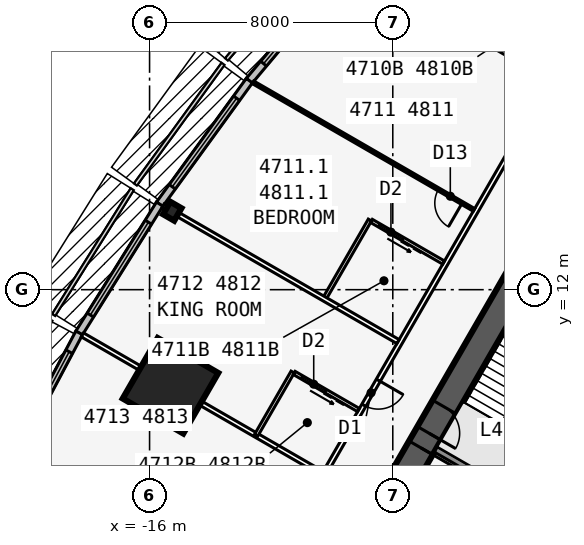
"""IFC4 building model, lengths in metres.
Left out: names, types, materials, properties, quantities, classifications, styles, units other than length and angle.
Written with IfcOpenShell. Run it as: python <this file> out.ifc"""

import sys

from ifc_helpers import new_model, si_unit, direction, frame, frame_2d, origin, origin_2d, place, context, subcontext, project, spatial, rectangle, i_section, extrude, element, fill, save


model = new_model("IFC4")
c1 = context("Model", 3, precision=1e-05, world=origin(), true_north=direction((0.0, 1.0)))
c2 = subcontext(c1, "Body", "Model", "MODEL_VIEW")
j1 = project(units=[si_unit("LENGTHUNIT", "METRE"), si_unit("PLANEANGLEUNIT", "RADIAN")], contexts=[c1])
p1 = place(None, origin())
s1 = spatial("IfcSite", under=j1, at=p1, CompositionType="ELEMENT")
p2 = place(p1, origin())
s2 = spatial("IfcBuilding", under=s1, at=p2, CompositionType="ELEMENT")
p3 = place(p2, frame((0.0, 0.0, 175.9)))
s3 = spatial("IfcBuildingStorey", under=s2, at=p3, CompositionType="ELEMENT", Elevation=175.9)
p4 = place(p3, frame((0.0, 19.052, 0.0), z_axis=(0.0, 0.0, 1.0), x_axis=(-0.499999749417, -0.866025548458, 0.0)))
e1 = element("IfcWall", 1, at=p4, inside=s3, PredefinedType="SHEAR", context=c2, shape_type="SweptSolid", body=[
    extrude(rectangle(XDim=33.0, YDim=0.9, at=frame_2d((16.5, 0.0))), origin(), (0.0, 0.0, 1.0), 3.4),
])
p5 = place(p4, frame((14.15, 0.0, 0.0)))
e2 = element("IfcOpeningElement", 2, at=p5, cuts=e1, PredefinedType="OPENING", context=c2, shape_type="SweptSolid", body=[
    extrude(rectangle(XDim=1.8, YDim=2.13, at=frame_2d((0.9, 1.065))), frame((0.0, 0.46, 0.0), z_axis=(0.0, -1.0, 0.0), x_axis=(1.0, 0.0, 0.0)), (0.0, 0.0, 1.0), 0.92),
])
p6 = place(p4, frame((12.6, 0.0, 0.0)))
e3 = element("IfcOpeningElement", 3, at=p6, cuts=e1, PredefinedType="OPENING", context=c2, shape_type="SweptSolid", body=[
    extrude(rectangle(XDim=1.0, YDim=2.13, at=frame_2d((0.5, 1.065))), frame((0.0, 0.46, 0.0), z_axis=(0.0, -1.0, 0.0), x_axis=(1.0, 0.0, 0.0)), (0.0, 0.0, 1.0), 0.92),
])
p7 = place(p3, frame((-3.879, 5.184, 0.0), z_axis=(0.0, 0.0, 1.0), x_axis=(-0.866022959057, 0.500004234368, 0.0)))
e4 = element("IfcWall", 4, at=p7, inside=s3, PredefinedType="SOLIDWALL", context=c2, shape_type="SweptSolid", body=[
    extrude(rectangle(XDim=3.125, YDim=0.2, at=frame_2d((1.562, 0.0))), origin(), (0.0, 0.0, 1.0), 3.235),
])
p8 = place(p3, frame((-15.254, 14.58, 0.0), z_axis=(0.0, 0.0, 1.0), x_axis=(-0.866025403784, 0.5, 0.0)))
e5 = element("IfcColumn", 5, at=p8, inside=s3, PredefinedType="COLUMN", context=c2, shape_type="SweptSolid", body=[
    extrude(i_section(OverallWidth=0.424, OverallDepth=0.475, WebThickness=0.048, FlangeThickness=0.077, at=origin_2d()), origin(), (0.0, 0.0, 1.0), 3.4),
])
p9 = place(p3, frame((-15.312, 8.84, 0.0), z_axis=(0.0, 0.0, 1.0), x_axis=(-0.866025403784, 0.5, 0.0)))
e6 = element("IfcColumn", 6, at=p9, inside=s3, PredefinedType="COLUMN", context=c2, shape_type="SweptSolid", body=[
    extrude(rectangle(XDim=2.3, YDim=2.3, at=origin_2d()), origin(), (0.0, 0.0, 1.0), 3.4),
])
p10 = place(p3, frame((-9.465, 22.76, 0.0), z_axis=(0.0, 0.0, 1.0), x_axis=(-0.641810386606, -0.766863369607, 0.0)))
e7 = element("IfcWall", 7, at=p10, inside=s3, PredefinedType="STANDARD", context=c2, shape_type="SweptSolid", body=[
    extrude(rectangle(XDim=5.076, YDim=0.25, at=frame_2d((2.538, 0.0))), origin(), (0.0, 0.0, 1.0), 3.235),
])
p11 = place(p10, frame((0.738, 0.0, 0.45)))
e8 = element("IfcOpeningElement", 8, at=p11, cuts=e7, PredefinedType="OPENING", context=c2, shape_type="SweptSolid", body=[
    extrude(rectangle(XDim=3.6, YDim=2.4, at=frame_2d((1.8, 1.2))), frame((0.0, 0.135, 0.0), z_axis=(0.0, -1.0, 0.0), x_axis=(1.0, 0.0, 0.0)), (0.0, 0.0, 1.0), 0.27),
])
p12 = place(p3, frame((-12.718, 18.875, 0.0), z_axis=(0.0, 0.0, 1.0), x_axis=(-0.587669188412, -0.809101307001, 0.0)))
e9 = element("IfcWall", 9, at=p12, inside=s3, PredefinedType="STANDARD", context=c2, shape_type="SweptSolid", body=[
    extrude(rectangle(XDim=5.028, YDim=0.25, at=frame_2d((2.514, 0.0))), origin(), (0.0, 0.0, 1.0), 3.235),
])
p13 = place(p12, frame((0.714, 0.0, 0.45)))
e10 = element("IfcOpeningElement", 10, at=p13, cuts=e9, PredefinedType="OPENING", context=c2, shape_type="SweptSolid", body=[
    extrude(rectangle(XDim=3.6, YDim=2.4, at=frame_2d((1.8, 1.2))), frame((0.0, 0.135, 0.0), z_axis=(0.0, -1.0, 0.0), x_axis=(1.0, 0.0, 0.0)), (0.0, 0.0, 1.0), 0.27),
])
p14 = place(p3, frame((-15.667, 14.814, 0.0), z_axis=(0.0, 0.0, 1.0), x_axis=(-0.529990167382, -0.84800378683, 0.0)))
e11 = element("IfcWall", 11, at=p14, inside=s3, PredefinedType="STANDARD", context=c2, shape_type="SweptSolid", body=[
    extrude(rectangle(XDim=5.003, YDim=0.25, at=frame_2d((2.501, 0.0))), origin(), (0.0, 0.0, 1.0), 3.235),
])
p15 = place(p14, frame((0.701, 0.0, 0.45)))
e12 = element("IfcOpeningElement", 12, at=p15, cuts=e11, PredefinedType="OPENING", context=c2, shape_type="SweptSolid", body=[
    extrude(rectangle(XDim=3.6, YDim=2.4, at=frame_2d((1.8, 1.2))), frame((0.0, 0.135, 0.0), z_axis=(0.0, -1.0, 0.0), x_axis=(1.0, 0.0, 0.0)), (0.0, 0.0, 1.0), 0.27),
])
p16 = place(p3, frame((-18.314, 10.579, 0.0), z_axis=(0.0, 0.0, 1.0), x_axis=(-0.469404966864, -0.882982999317, 0.0)))
e13 = element("IfcWall", 13, at=p16, inside=s3, PredefinedType="STANDARD", context=c2, shape_type="SweptSolid", body=[
    extrude(rectangle(XDim=5.003, YDim=0.25, at=frame_2d((2.501, 0.0))), origin(), (0.0, 0.0, 1.0), 3.235),
])
p17 = place(p16, frame((0.701, 0.0, 0.45)))
e14 = element("IfcOpeningElement", 14, at=p17, cuts=e13, PredefinedType="OPENING", context=c2, shape_type="SweptSolid", body=[
    extrude(rectangle(XDim=3.6, YDim=2.4, at=frame_2d((1.8, 1.2))), frame((0.0, 0.135, 0.0), z_axis=(0.0, -1.0, 0.0), x_axis=(1.0, 0.0, 0.0)), (0.0, 0.0, 1.0), 0.27),
])
p18 = place(p3, frame((-0.5, 22.836, 0.0), z_axis=(0.0, 0.0, 1.0), x_axis=(-0.500001677587, -0.866024435227, 0.0)))
e15 = element("IfcWall", 15, at=p18, inside=s3, PredefinedType="PARTITIONING", context=c2, shape_type="SweptSolid", body=[
    extrude(rectangle(XDim=39.054, YDim=0.15, at=frame_2d((19.527, 0.0))), origin(), (0.0, 0.0, 1.0), 3.235),
])
p19 = place(p18, frame((0.352, 0.0, 0.0)))
e16 = element("IfcOpeningElement", 16, at=p19, cuts=e15, PredefinedType="OPENING", context=c2, shape_type="SweptSolid", body=[
    extrude(rectangle(XDim=0.95, YDim=2.13, at=frame_2d((0.475, 1.065))), frame((0.0, 0.085, 0.0), z_axis=(0.0, -1.0, 0.0), x_axis=(1.0, 0.0, 0.0)), (0.0, 0.0, 1.0), 0.17),
])
p20 = place(p18, frame((6.552, 0.0, 0.0)))
e17 = element("IfcOpeningElement", 17, at=p20, cuts=e15, PredefinedType="OPENING", context=c2, shape_type="SweptSolid", body=[
    extrude(rectangle(XDim=0.95, YDim=2.13, at=frame_2d((0.475, 1.065))), frame((0.0, 0.085, 0.0), z_axis=(0.0, -1.0, 0.0), x_axis=(1.0, 0.0, 0.0)), (0.0, 0.0, 1.0), 0.17),
])
p21 = place(p18, frame((15.952, 0.0, 0.0)))
e18 = element("IfcOpeningElement", 18, at=p21, cuts=e15, PredefinedType="OPENING", context=c2, shape_type="SweptSolid", body=[
    extrude(rectangle(XDim=0.95, YDim=2.13, at=frame_2d((0.475, 1.065))), frame((0.0, 0.085, 0.0), z_axis=(0.0, -1.0, 0.0), x_axis=(1.0, 0.0, 0.0)), (0.0, 0.0, 1.0), 0.17),
])
p22 = place(p18, frame((21.552, 0.0, 0.0)))
e19 = element("IfcOpeningElement", 19, at=p22, cuts=e15, PredefinedType="OPENING", context=c2, shape_type="SweptSolid", body=[
    extrude(rectangle(XDim=0.95, YDim=2.13, at=frame_2d((0.475, 1.065))), frame((0.0, 0.085, 0.0), z_axis=(0.0, -1.0, 0.0), x_axis=(1.0, 0.0, 0.0)), (0.0, 0.0, 1.0), 0.17),
])
p23 = place(p18, frame((30.952, 0.0, 0.0)))
e20 = element("IfcOpeningElement", 20, at=p23, cuts=e15, PredefinedType="OPENING", context=c2, shape_type="SweptSolid", body=[
    extrude(rectangle(XDim=0.95, YDim=2.13, at=frame_2d((0.475, 1.065))), frame((0.0, 0.085, 0.0), z_axis=(0.0, -1.0, 0.0), x_axis=(1.0, 0.0, 0.0)), (0.0, 0.0, 1.0), 0.17),
])
p24 = place(p18, frame((37.752, 0.0, 0.0)))
e21 = element("IfcOpeningElement", 21, at=p24, cuts=e15, PredefinedType="OPENING", context=c2, shape_type="SweptSolid", body=[
    extrude(rectangle(XDim=0.95, YDim=2.13, at=frame_2d((0.475, 1.065))), frame((0.0, 0.085, 0.0), z_axis=(0.0, -1.0, 0.0), x_axis=(1.0, 0.0, 0.0)), (0.0, 0.0, 1.0), 0.17),
])
p25 = place(p3, frame((-2.829, 18.954, 0.0), z_axis=(0.0, 0.0, 1.0), x_axis=(-0.866015739374, 0.500016738876, 0.0)))
e22 = element("IfcWall", 22, at=p25, inside=s3, PredefinedType="PARTITIONING", context=c2, shape_type="SweptSolid", body=[
    extrude(rectangle(XDim=7.516, YDim=0.15, at=frame_2d((3.758, 0.0))), origin(), (0.0, 0.0, 1.0), 2.389),
])
p26 = place(p3, frame((-5.329, 14.623, 0.0), z_axis=(0.0, 0.0, 1.0), x_axis=(-0.866011723728, 0.500023693804, 0.0)))
e23 = element("IfcWall", 23, at=p26, inside=s3, PredefinedType="PARTITIONING", context=c2, shape_type="SweptSolid", body=[
    extrude(rectangle(XDim=8.395, YDim=0.1, at=frame_2d((4.198, 0.0))), origin(), (0.0, 0.0, 1.0), 2.389),
])
p27 = place(p26, frame((0.45, 0.0, 0.0)))
e24 = element("IfcOpeningElement", 24, at=p27, cuts=e23, PredefinedType="OPENING", context=c2, shape_type="SweptSolid", body=[
    extrude(rectangle(XDim=0.9, YDim=2.13, at=frame_2d((0.45, 1.065))), frame((0.0, 0.06, 0.0), z_axis=(0.0, -1.0, 0.0), x_axis=(1.0, 0.0, 0.0)), (0.0, 0.0, 1.0), 0.12),
])
p28 = place(p3, frame((-7.829, 10.293, 0.0), z_axis=(0.0, 0.0, 1.0), x_axis=(-0.866027015393, 0.499997208602, 0.0)))
e25 = element("IfcWall", 25, at=p28, inside=s3, PredefinedType="PARTITIONING", context=c2, shape_type="SweptSolid", body=[
    extrude(rectangle(XDim=8.922, YDim=0.15, at=frame_2d((4.461, 0.0))), origin(), (0.0, 0.0, 1.0), 2.389),
])
p29 = place(p3, frame((-10.329, 5.963, 0.0), z_axis=(0.0, 0.0, 1.0), x_axis=(-0.866025170687, 0.500000403736, 0.0)))
e26 = element("IfcWall", 26, at=p29, inside=s3, PredefinedType="PARTITIONING", context=c2, shape_type="SweptSolid", body=[
    extrude(rectangle(XDim=9.099, YDim=0.15, at=frame_2d((4.549, 0.0))), origin(), (0.0, 0.0, 1.0), 2.389),
])
p30 = place(p3, frame((-8.753, 14.291, 0.0), z_axis=(0.0, 0.0, 1.0), x_axis=(-0.50002537861, -0.866010750942, 0.0)))
e27 = element("IfcWall", 27, at=p30, inside=s3, PredefinedType="PLUMBINGWALL", context=c2, shape_type="SweptSolid", body=[
    extrude(rectangle(XDim=3.0, YDim=0.12, at=frame_2d((1.5, 0.0))), origin(), (0.0, 0.0, 1.0), 3.235),
])
p31 = place(p3, frame((-6.329, 12.891, 0.0), z_axis=(0.0, 0.0, 1.0), x_axis=(-0.866035715982, 0.499982138324, 0.0)))
e28 = element("IfcWall", 28, at=p31, inside=s3, PredefinedType="PLUMBINGWALL", context=c2, shape_type="SweptSolid", body=[
    extrude(rectangle(XDim=2.74, YDim=0.12, at=frame_2d((1.37, 0.0))), origin(), (0.0, 0.0, 1.0), 3.235),
])
p32 = place(p31, frame((1.55, 0.0, 0.0)))
e29 = element("IfcOpeningElement", 29, at=p32, cuts=e28, PredefinedType="OPENING", context=c2, shape_type="SweptSolid", body=[
    extrude(rectangle(XDim=0.9, YDim=2.13, at=frame_2d((0.45, 1.065))), frame((0.0, 0.07, 0.0), z_axis=(0.0, -1.0, 0.0), x_axis=(1.0, 0.0, 0.0)), (0.0, 0.0, 1.0), 0.14),
])
p33 = place(p3, frame((-11.293, 9.292, 0.0), z_axis=(0.0, 0.0, 1.0), x_axis=(-0.500001309137, -0.866024647952, 0.0)))
e30 = element("IfcWall", 30, at=p33, inside=s3, PredefinedType="PLUMBINGWALL", context=c2, shape_type="SweptSolid", body=[
    extrude(rectangle(XDim=2.4, YDim=0.12, at=frame_2d((1.2, 0.0))), origin(), (0.0, 0.0, 1.0), 3.235),
])
p34 = place(p3, frame((-9.128, 8.042, 0.0), z_axis=(0.0, 0.0, 1.0), x_axis=(-0.866005645448, 0.500034220881, 0.0)))
e31 = element("IfcWall", 31, at=p34, inside=s3, PredefinedType="PLUMBINGWALL", context=c2, shape_type="SweptSolid", body=[
    extrude(rectangle(XDim=2.44, YDim=0.12, at=frame_2d((1.22, 0.0))), origin(), (0.0, 0.0, 1.0), 3.235),
])
p35 = place(p34, frame((1.25, 0.0, 0.0)))
e32 = element("IfcOpeningElement", 32, at=p35, cuts=e31, PredefinedType="OPENING", context=c2, shape_type="SweptSolid", body=[
    extrude(rectangle(XDim=0.9, YDim=2.13, at=frame_2d((0.45, 1.065))), frame((0.0, 0.07, 0.0), z_axis=(0.0, -1.0, 0.0), x_axis=(1.0, 0.0, 0.0)), (0.0, 0.0, 1.0), 0.14),
])
p36 = place(p3, frame((-2.988, 9.978, 0.0), z_axis=(0.0, 0.0, 1.0), x_axis=(-0.499992232847, -0.866029888106, 0.0)))
e33 = element("IfcWall", 33, at=p36, inside=s3, PredefinedType="SOLIDWALL", context=c2, shape_type="SweptSolid", body=[
    extrude(rectangle(XDim=2.794, YDim=0.1, at=frame_2d((1.397, 0.0))), origin(), (0.0, 0.0, 1.0), 3.4),
])
p37 = place(p11, origin())
e34 = element("IfcWindow", 34, at=p37, inside=s3, PartitioningType="SINGLE_PANEL", PredefinedType="WINDOW", context=c2, shape_type="SweptSolid", body=[
    extrude(rectangle(XDim=3.6, YDim=2.4, at=frame_2d((1.8, 1.2))), frame((0.0, 0.03, 0.0), z_axis=(0.0, -1.0, 0.0), x_axis=(1.0, 0.0, 0.0)), (0.0, 0.0, 1.0), 0.06),
])
fill(e8, e34)
p38 = place(p13, origin())
e35 = element("IfcWindow", 35, at=p38, inside=s3, PartitioningType="SINGLE_PANEL", PredefinedType="WINDOW", context=c2, shape_type="SweptSolid", body=[
    extrude(rectangle(XDim=3.6, YDim=2.4, at=frame_2d((1.8, 1.2))), frame((0.0, 0.03, 0.0), z_axis=(0.0, -1.0, 0.0), x_axis=(1.0, 0.0, 0.0)), (0.0, 0.0, 1.0), 0.06),
])
fill(e10, e35)
p39 = place(p15, origin())
e36 = element("IfcWindow", 36, at=p39, inside=s3, PartitioningType="SINGLE_PANEL", PredefinedType="WINDOW", context=c2, shape_type="SweptSolid", body=[
    extrude(rectangle(XDim=3.6, YDim=2.4, at=frame_2d((1.8, 1.2))), frame((0.0, 0.03, 0.0), z_axis=(0.0, -1.0, 0.0), x_axis=(1.0, 0.0, 0.0)), (0.0, 0.0, 1.0), 0.06),
])
fill(e12, e36)
p40 = place(p17, origin())
e37 = element("IfcWindow", 37, at=p40, inside=s3, PartitioningType="SINGLE_PANEL", PredefinedType="WINDOW", context=c2, shape_type="SweptSolid", body=[
    extrude(rectangle(XDim=3.6, YDim=2.4, at=frame_2d((1.8, 1.2))), frame((0.0, 0.03, 0.0), z_axis=(0.0, -1.0, 0.0), x_axis=(1.0, 0.0, 0.0)), (0.0, 0.0, 1.0), 0.06),
])
fill(e14, e37)
p41 = place(p27, origin())
e38 = element("IfcDoor", 38, at=p41, inside=s3, OperationType="SINGLE_SWING_LEFT", PredefinedType="DOOR", context=c2, shape_type="SweptSolid", body=[
    extrude(rectangle(XDim=0.9, YDim=2.13, at=frame_2d((0.45, 1.065))), frame((0.0, 0.025, 0.0), z_axis=(0.0, -1.0, 0.0), x_axis=(1.0, 0.0, 0.0)), (0.0, 0.0, 1.0), 0.05),
])
fill(e24, e38)
p42 = place(p32, origin())
e39 = element("IfcDoor", 39, at=p42, inside=s3, OperationType="SLIDING_TO_LEFT", PredefinedType="DOOR", context=c2, shape_type="SweptSolid", body=[
    extrude(rectangle(XDim=0.9, YDim=2.13, at=frame_2d((0.45, 1.065))), frame((0.0, 0.025, 0.0), z_axis=(0.0, -1.0, 0.0), x_axis=(1.0, 0.0, 0.0)), (0.0, 0.0, 1.0), 0.05),
])
fill(e29, e39)
p43 = place(p35, origin())
e40 = element("IfcDoor", 40, at=p43, inside=s3, OperationType="SLIDING_TO_LEFT", PredefinedType="DOOR", context=c2, shape_type="SweptSolid", body=[
    extrude(rectangle(XDim=0.9, YDim=2.13, at=frame_2d((0.45, 1.065))), frame((0.0, 0.025, 0.0), z_axis=(0.0, -1.0, 0.0), x_axis=(1.0, 0.0, 0.0)), (0.0, 0.0, 1.0), 0.05),
])
fill(e32, e40)
p44 = place(p21, origin())
e41 = element("IfcDoor", 41, at=p44, inside=s3, OperationType="SINGLE_SWING_LEFT", PredefinedType="DOOR", context=c2, shape_type="SweptSolid", body=[
    extrude(rectangle(XDim=0.95, YDim=2.13, at=frame_2d((0.475, 1.065))), frame((0.0, 0.025, 0.0), z_axis=(0.0, -1.0, 0.0), x_axis=(1.0, 0.0, 0.0)), (0.0, 0.0, 1.0), 0.05),
])
fill(e18, e41)
p45 = place(p5, origin())
e42 = element("IfcDoor", 42, at=p45, inside=s3, OperationType="DOUBLE_DOOR_SINGLE_SWING", PredefinedType="DOOR", context=c2, shape_type="SweptSolid", body=[
    extrude(rectangle(XDim=1.8, YDim=2.13, at=frame_2d((0.9, 1.065))), frame((0.0, 0.025, 0.0), z_axis=(0.0, -1.0, 0.0), x_axis=(1.0, 0.0, 0.0)), (0.0, 0.0, 1.0), 0.05),
])
fill(e2, e42)
p46 = place(p6, origin())
e43 = element("IfcDoor", 43, at=p46, inside=s3, OperationType="SINGLE_SWING_RIGHT", PredefinedType="DOOR", context=c2, shape_type="SweptSolid", body=[
    extrude(rectangle(XDim=1.0, YDim=2.13, at=frame_2d((0.5, 1.065))), frame((0.0, 0.025, 0.0), z_axis=(0.0, -1.0, 0.0), x_axis=(1.0, 0.0, 0.0)), (0.0, 0.0, 1.0), 0.05),
])
fill(e3, e43)
save(model, sys.argv[1])
